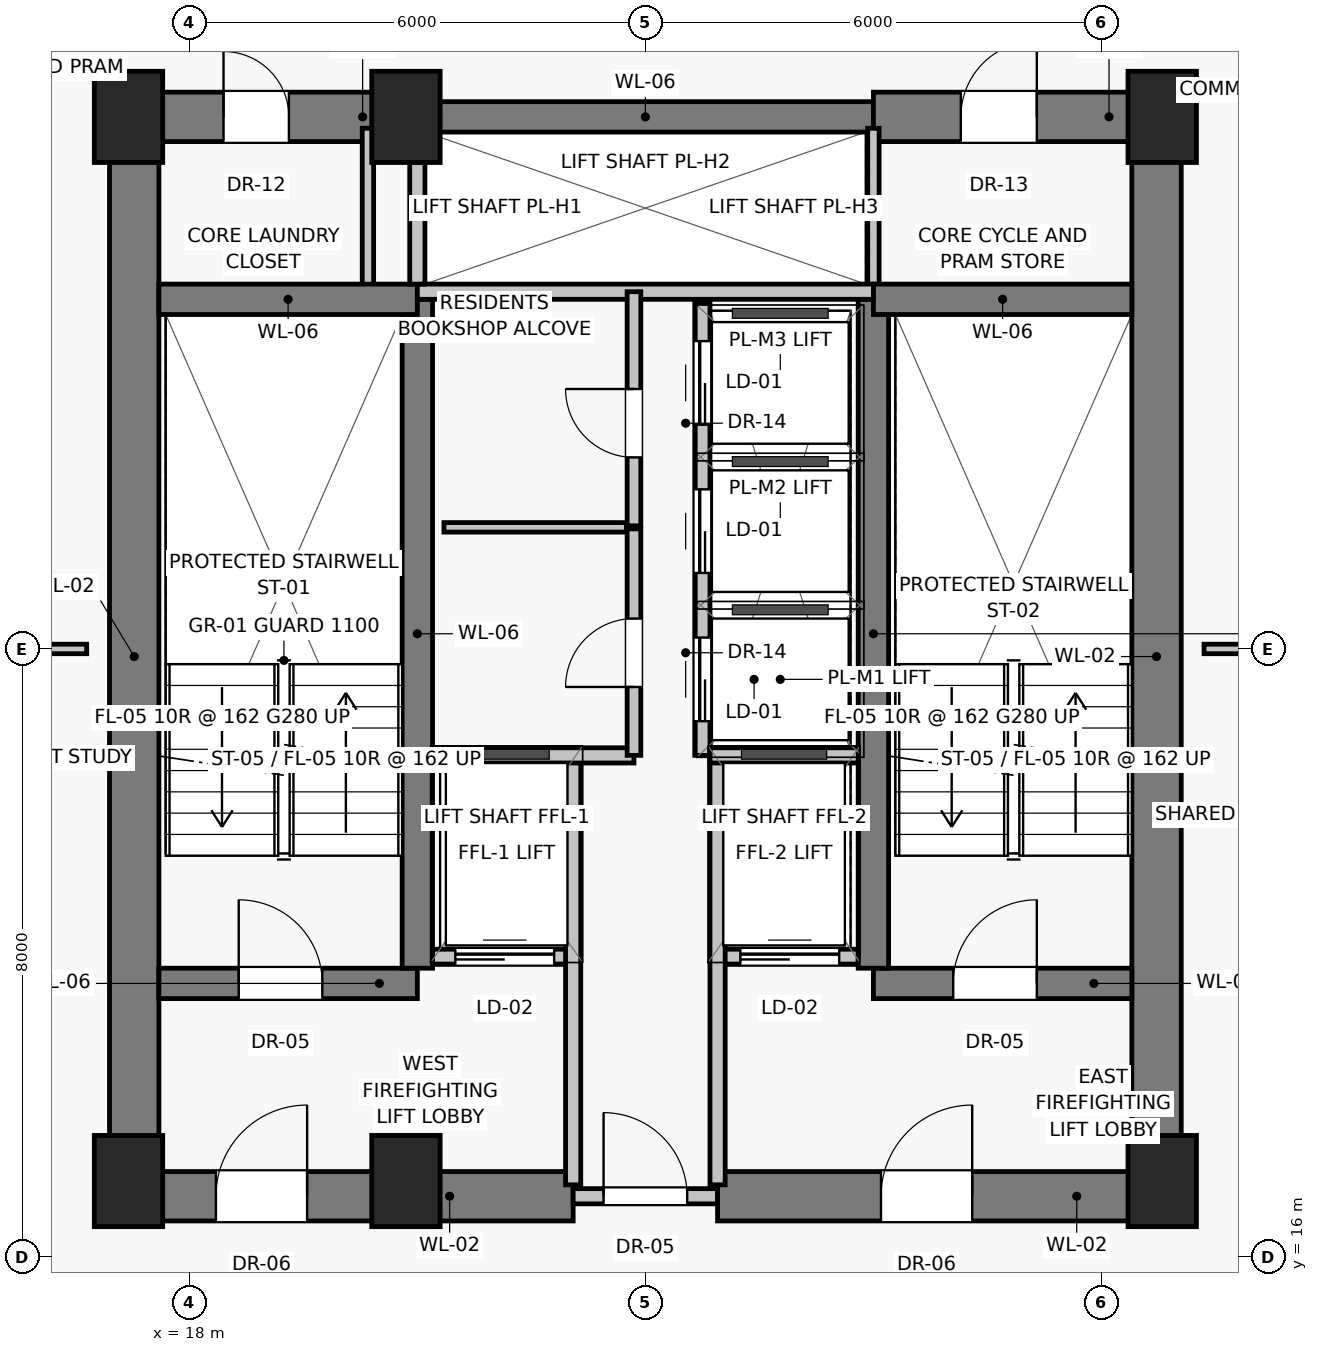
"""IFC4 building model, lengths in metres.
Left out: names, types, materials, properties, quantities, classifications, styles, units other than length and angle.
Written with IfcOpenShell. Run it as: python <this file> out.ifc"""

import sys

from ifc_helpers import new_model, si_unit, direction, frame, frame_2d, origin, origin_2d, place, context, subcontext, project, spatial, rectangle, extrude, source, transform, mapped, element, fill, save


model = new_model("IFC4")
c1 = context("Model", 3, precision=1e-05, world=origin(), true_north=direction((0.0, 1.0)))
c2 = subcontext(c1, "Body", "Model", "MODEL_VIEW")
j1 = project(units=[si_unit("LENGTHUNIT", "METRE"), si_unit("PLANEANGLEUNIT", "RADIAN")], contexts=[c1])
p1 = place(None, origin())
s1 = spatial("IfcSite", under=j1, at=p1, CompositionType="ELEMENT")
p2 = place(p1, origin())
s2 = spatial("IfcBuilding", under=s1, at=p2, CompositionType="ELEMENT")
p3 = place(p2, frame((0.0, 0.0, 155.5)))
s3 = spatial("IfcBuildingStorey", under=s2, at=p3, CompositionType="ELEMENT", Elevation=155.5)
for number, where, z_axis, x_axis in (
    (1, (17.2, 17.0, 0.0), (0.0, 0.0, 1.0), (1.0, 0.0, 0.0)),
    (2, (20.85, 17.0, 0.0), (0.0, 0.0, 1.0), (1.0, 0.0, 0.0)),
    (3, (30.8, 17.0, 0.0), (0.0, 0.0, 1.0), (1.0, 0.0, 0.0)),
    (4, (17.2, 31.0, 0.0), (0.0, 0.0, 1.0), (1.0, 0.0, 0.0)),
    (5, (20.85, 31.0, 0.0), (0.0, 0.0, 1.0), (1.0, 0.0, 0.0)),
    (6, (30.8, 31.0, 0.0), (0.0, 0.0, 1.0), (1.0, 0.0, 0.0)),
):
    element("IfcColumn", number, at=place(p3, frame(where, z_axis=z_axis, x_axis=x_axis)), inside=s3, PredefinedType="PILASTER", context=c2, shape_type="SweptSolid", body=[
        extrude(rectangle(XDim=0.9, YDim=1.2, at=origin_2d()), origin(), (0.0, 0.0, 1.0), 3.25),
    ])
for number, where, z_axis, x_axis in (
    (7, (17.275, 16.8, 0.0), (0.0, 0.0, 1.0), (0.0, 1.0, 0.0)),
    (8, (30.725, 16.8, 0.0), (0.0, 0.0, 1.0), (0.0, 1.0, 0.0)),
):
    element("IfcWall", number, at=place(p3, frame(where, z_axis=z_axis, x_axis=x_axis)), inside=s3, PredefinedType="SHEAR", context=c2, shape_type="SweptSolid", body=[
        extrude(rectangle(XDim=14.2, YDim=0.65, at=frame_2d((7.1, 0.0))), origin(), (0.0, 0.0, 1.0), 2.97),
    ])
p4 = place(p3, frame((17.2, 16.8, 0.0), z_axis=(0.0, 0.0, 1.0), x_axis=(1.0, 0.0, 0.0)))
e9 = element("IfcWall", 9, at=p4, inside=s3, PredefinedType="SHEAR", context=c2, shape_type="SweptSolid", body=[
    extrude(rectangle(XDim=5.85, YDim=0.65, at=frame_2d((2.925, 0.0))), origin(), (0.0, 0.0, 1.0), 2.97),
])
p5 = place(p4, frame((1.15, 0.0, 0.0)))
e10 = element("IfcOpeningElement", 10, at=p5, cuts=e9, PredefinedType="OPENING", context=c2, shape_type="SweptSolid", body=[
    extrude(rectangle(XDim=1.2, YDim=2.03, at=frame_2d((0.6, 1.015))), frame((0.0, 0.335, 0.0), z_axis=(0.0, -1.0, 0.0), x_axis=(1.0, 0.0, 0.0)), (0.0, 0.0, 1.0), 0.67),
])
p6 = place(p3, frame((23.05, 16.8, 0.0), z_axis=(0.0, 0.0, 1.0), x_axis=(1.0, 0.0, 0.0)))
e11 = element("IfcWall", 11, at=p6, inside=s3, PredefinedType="SOLIDWALL", context=c2, shape_type="SweptSolid", body=[
    extrude(rectangle(XDim=1.9, YDim=0.2, at=frame_2d((0.95, 0.0))), origin(), (0.0, 0.0, 1.0), 2.12),
])
p7 = place(p6, frame((0.4, 0.0, 0.0)))
e12 = element("IfcOpeningElement", 12, at=p7, cuts=e11, PredefinedType="OPENING", context=c2, shape_type="SweptSolid", body=[
    extrude(rectangle(XDim=1.1, YDim=2.03, at=frame_2d((0.55, 1.015))), frame((0.0, 0.11, 0.0), z_axis=(0.0, -1.0, 0.0), x_axis=(1.0, 0.0, 0.0)), (0.0, 0.0, 1.0), 0.22),
])
p8 = place(p3, frame((24.95, 16.8, 0.0), z_axis=(0.0, 0.0, 1.0), x_axis=(1.0, 0.0, 0.0)))
e13 = element("IfcWall", 13, at=p8, inside=s3, PredefinedType="SHEAR", context=c2, shape_type="SweptSolid", body=[
    extrude(rectangle(XDim=5.85, YDim=0.65, at=frame_2d((2.925, 0.0))), origin(), (0.0, 0.0, 1.0), 2.97),
])
p9 = place(p8, frame((2.15, 0.0, 0.0)))
e14 = element("IfcOpeningElement", 14, at=p9, cuts=e13, PredefinedType="OPENING", context=c2, shape_type="SweptSolid", body=[
    extrude(rectangle(XDim=1.2, YDim=2.03, at=frame_2d((0.6, 1.015))), frame((0.0, 0.335, 0.0), z_axis=(0.0, -1.0, 0.0), x_axis=(1.0, 0.0, 0.0)), (0.0, 0.0, 1.0), 0.67),
])
p10 = place(p3, frame((17.2, 31.0, 0.0), z_axis=(0.0, 0.0, 1.0), x_axis=(1.0, 0.0, 0.0)))
e15 = element("IfcWall", 15, at=p10, inside=s3, PredefinedType="SHEAR", context=c2, shape_type="SweptSolid", body=[
    extrude(rectangle(XDim=3.8, YDim=0.65, at=frame_2d((1.9, 0.0))), origin(), (0.0, 0.0, 1.0), 2.97),
])
p11 = place(p10, frame((1.25, 0.0, 0.0)))
e16 = element("IfcOpeningElement", 16, at=p11, cuts=e15, PredefinedType="OPENING", context=c2, shape_type="SweptSolid", body=[
    extrude(rectangle(XDim=0.86, YDim=2.01, at=frame_2d((0.43, 1.005))), frame((0.0, 0.335, 0.0), z_axis=(0.0, -1.0, 0.0), x_axis=(1.0, 0.0, 0.0)), (0.0, 0.0, 1.0), 0.67),
])
p12 = place(p3, frame((21.0, 31.0, 0.0), z_axis=(0.0, 0.0, 1.0), x_axis=(1.0, 0.0, 0.0)))
e17 = element("IfcWall", 17, at=p12, inside=s3, PredefinedType="SHEAR", context=c2, shape_type="SweptSolid", body=[
    extrude(rectangle(XDim=6.0, YDim=0.4, at=frame_2d((3.0, 0.0))), origin(), (0.0, 0.0, 1.0), 2.97),
])
p13 = place(p3, frame((27.0, 31.0, 0.0), z_axis=(0.0, 0.0, 1.0), x_axis=(1.0, 0.0, 0.0)))
e18 = element("IfcWall", 18, at=p13, inside=s3, PredefinedType="SHEAR", context=c2, shape_type="SweptSolid", body=[
    extrude(rectangle(XDim=3.8, YDim=0.65, at=frame_2d((1.9, 0.0))), origin(), (0.0, 0.0, 1.0), 2.97),
])
p14 = place(p13, frame((1.15, 0.0, 0.0)))
e19 = element("IfcOpeningElement", 19, at=p14, cuts=e18, PredefinedType="OPENING", context=c2, shape_type="SweptSolid", body=[
    extrude(rectangle(XDim=1.0, YDim=2.01, at=frame_2d((0.5, 1.005))), frame((0.0, 0.335, 0.0), z_axis=(0.0, -1.0, 0.0), x_axis=(1.0, 0.0, 0.0)), (0.0, 0.0, 1.0), 0.67),
])
for number, where, z_axis, x_axis in (
    (20, (20.35, 28.65, 0.0), (0.0, 0.0, 1.0), (0.0, 1.0, 0.0)),
    (21, (27.0, 28.65, 0.0), (0.0, 0.0, 1.0), (0.0, 1.0, 0.0)),
):
    element("IfcWall", number, at=place(p3, frame(where, z_axis=z_axis, x_axis=x_axis)), inside=s3, PredefinedType="PARTITIONING", context=c2, shape_type="SweptSolid", body=[
        extrude(rectangle(XDim=2.2, YDim=0.15, at=frame_2d((1.1, 0.0))), origin(), (0.0, 0.0, 1.0), 2.97),
    ])
p15 = place(p3, frame((17.6, 19.6, 0.0), z_axis=(0.0, 0.0, 1.0), x_axis=(1.0, 0.0, 0.0)))
e22 = element("IfcWall", 22, at=p15, inside=s3, PredefinedType="SHEAR", context=c2, shape_type="SweptSolid", body=[
    extrude(rectangle(XDim=3.4, YDim=0.4, at=frame_2d((1.7, 0.0))), origin(), (0.0, 0.0, 1.0), 2.97),
])
p16 = place(p15, frame((1.05, 0.0, 0.0)))
e23 = element("IfcOpeningElement", 23, at=p16, cuts=e22, PredefinedType="OPENING", context=c2, shape_type="SweptSolid", body=[
    extrude(rectangle(XDim=1.1, YDim=2.03, at=frame_2d((0.55, 1.015))), frame((0.0, 0.21, 0.0), z_axis=(0.0, -1.0, 0.0), x_axis=(1.0, 0.0, 0.0)), (0.0, 0.0, 1.0), 0.42),
])
p17 = place(p3, frame((21.2, 19.95, 0.0), z_axis=(0.0, 0.0, 1.0), x_axis=(1.0, 0.0, 0.0)))
e24 = element("IfcWall", 24, at=p17, inside=s3, PredefinedType="SOLIDWALL", context=c2, shape_type="SweptSolid", body=[
    extrude(rectangle(XDim=1.85, YDim=0.2, at=frame_2d((0.925, 0.0))), origin(), (0.0, 0.0, 1.0), 2.97),
])
p18 = place(p17, frame((0.3, 0.0, 0.0)))
e25 = element("IfcOpeningElement", 25, at=p18, cuts=e24, PredefinedType="OPENING", context=c2, shape_type="SweptSolid", body=[
    extrude(rectangle(XDim=1.3, YDim=2.25, at=frame_2d((0.65, 1.125))), frame((0.0, 0.11, 0.0), z_axis=(0.0, -1.0, 0.0), x_axis=(1.0, 0.0, 0.0)), (0.0, 0.0, 1.0), 0.22),
])
p19 = place(p3, frame((24.95, 19.95, 0.0), z_axis=(0.0, 0.0, 1.0), x_axis=(1.0, 0.0, 0.0)))
e26 = element("IfcWall", 26, at=p19, inside=s3, PredefinedType="SOLIDWALL", context=c2, shape_type="SweptSolid", body=[
    extrude(rectangle(XDim=1.85, YDim=0.2, at=frame_2d((0.925, 0.0))), origin(), (0.0, 0.0, 1.0), 2.97),
])
p20 = place(p19, frame((0.3, 0.0, 0.0)))
e27 = element("IfcOpeningElement", 27, at=p20, cuts=e26, PredefinedType="OPENING", context=c2, shape_type="SweptSolid", body=[
    extrude(rectangle(XDim=1.3, YDim=2.25, at=frame_2d((0.65, 1.125))), frame((0.0, 0.11, 0.0), z_axis=(0.0, -1.0, 0.0), x_axis=(1.0, 0.0, 0.0)), (0.0, 0.0, 1.0), 0.22),
])
p21 = place(p3, frame((27.0, 19.6, 0.0), z_axis=(0.0, 0.0, 1.0), x_axis=(1.0, 0.0, 0.0)))
e28 = element("IfcWall", 28, at=p21, inside=s3, PredefinedType="SHEAR", context=c2, shape_type="SweptSolid", body=[
    extrude(rectangle(XDim=3.4, YDim=0.4, at=frame_2d((1.7, 0.0))), origin(), (0.0, 0.0, 1.0), 2.97),
])
p22 = place(p21, frame((1.05, 0.0, 0.0)))
e29 = element("IfcOpeningElement", 29, at=p22, cuts=e28, PredefinedType="OPENING", context=c2, shape_type="SweptSolid", body=[
    extrude(rectangle(XDim=1.1, YDim=2.03, at=frame_2d((0.55, 1.015))), frame((0.0, 0.21, 0.0), z_axis=(0.0, -1.0, 0.0), x_axis=(1.0, 0.0, 0.0)), (0.0, 0.0, 1.0), 0.42),
])
for number, where, z_axis, x_axis in (
    (30, (21.0, 19.8, 0.0), (0.0, 0.0, 1.0), (0.0, 1.0, 0.0)),
    (31, (27.0, 19.8, 0.0), (0.0, 0.0, 1.0), (0.0, 1.0, 0.0)),
):
    element("IfcWall", number, at=place(p3, frame(where, z_axis=z_axis, x_axis=x_axis)), inside=s3, PredefinedType="SHEAR", context=c2, shape_type="SweptSolid", body=[
        extrude(rectangle(XDim=8.8, YDim=0.4, at=frame_2d((4.4, 0.0))), origin(), (0.0, 0.0, 1.0), 2.97),
    ])
for number, where, z_axis, x_axis in (
    (32, (17.6, 28.6, 0.0), (0.0, 0.0, 1.0), (1.0, 0.0, 0.0)),
    (33, (27.0, 28.6, 0.0), (0.0, 0.0, 1.0), (1.0, 0.0, 0.0)),
):
    element("IfcWall", number, at=place(p3, frame(where, z_axis=z_axis, x_axis=x_axis)), inside=s3, PredefinedType="SHEAR", context=c2, shape_type="SweptSolid", body=[
        extrude(rectangle(XDim=3.4, YDim=0.4, at=frame_2d((1.7, 0.0))), origin(), (0.0, 0.0, 1.0), 2.97),
    ])
for number, where, z_axis, x_axis in (
    (34, (23.05, 16.95, 0.0), (0.0, 0.0, 1.0), (0.0, 1.0, 0.0)),
    (35, (24.95, 16.95, 0.0), (0.0, 0.0, 1.0), (0.0, 1.0, 0.0)),
):
    element("IfcWall", number, at=place(p3, frame(where, z_axis=z_axis, x_axis=x_axis)), inside=s3, PredefinedType="SOLIDWALL", context=c2, shape_type="SweptSolid", body=[
        extrude(rectangle(XDim=5.6, YDim=0.2, at=frame_2d((2.8, 0.0))), origin(), (0.0, 0.0, 1.0), 2.97),
    ])
p23 = place(p3, frame((21.2, 22.6, 0.0), z_axis=(0.0, 0.0, 1.0), x_axis=(1.0, 0.0, 0.0)))
e36 = element("IfcWall", 36, at=p23, inside=s3, PredefinedType="SOLIDWALL", context=c2, shape_type="SweptSolid", body=[
    extrude(rectangle(XDim=2.65, YDim=0.2, at=frame_2d((1.325, 0.0))), origin(), (0.0, 0.0, 1.0), 2.97),
])
p24 = place(p3, frame((24.85, 22.6, 0.0), z_axis=(0.0, 0.0, 1.0), x_axis=(1.0, 0.0, 0.0)))
e37 = element("IfcWall", 37, at=p24, inside=s3, PredefinedType="SOLIDWALL", context=c2, shape_type="SweptSolid", body=[
    extrude(rectangle(XDim=1.95, YDim=0.2, at=frame_2d((0.975, 0.0))), origin(), (0.0, 0.0, 1.0), 2.97),
])
p25 = place(p3, frame((21.0, 28.7, 0.0), z_axis=(0.0, 0.0, 1.0), x_axis=(1.0, 0.0, 0.0)))
e38 = element("IfcWall", 38, at=p25, inside=s3, PredefinedType="SOLIDWALL", context=c2, shape_type="SweptSolid", body=[
    extrude(rectangle(XDim=6.0, YDim=0.2, at=frame_2d((3.0, 0.0))), origin(), (0.0, 0.0, 1.0), 2.97),
])
p26 = place(p3, frame((21.0, 28.8, 0.0), z_axis=(0.0, 0.0, 1.0), x_axis=(0.0, 1.0, 0.0)))
e39 = element("IfcWall", 39, at=p26, inside=s3, PredefinedType="SOLIDWALL", context=c2, shape_type="SweptSolid", body=[
    extrude(rectangle(XDim=1.6, YDim=0.2, at=frame_2d((0.8, 0.0))), origin(), (0.0, 0.0, 1.0), 2.97),
])
p27 = place(p3, frame((23.85, 22.6, 0.0), z_axis=(0.0, 0.0, 1.0), x_axis=(0.0, 1.0, 0.0)))
e40 = element("IfcWall", 40, at=p27, inside=s3, PredefinedType="PARTITIONING", context=c2, shape_type="SweptSolid", body=[
    extrude(rectangle(XDim=2.98, YDim=0.18, at=frame_2d((1.49, 0.0))), origin(), (0.0, 0.0, 1.0), 2.97),
])
p28 = place(p27, frame((0.9, 0.0, 0.0)))
e41 = element("IfcOpeningElement", 41, at=p28, cuts=e40, PredefinedType="OPENING", context=c2, shape_type="SweptSolid", body=[
    extrude(rectangle(XDim=0.9, YDim=2.01, at=frame_2d((0.45, 1.005))), frame((0.0, 0.1, 0.0), z_axis=(0.0, -1.0, 0.0), x_axis=(1.0, 0.0, 0.0)), (0.0, 0.0, 1.0), 0.2),
])
p29 = place(p3, frame((23.85, 25.62, 0.0), z_axis=(0.0, 0.0, 1.0), x_axis=(0.0, 1.0, 0.0)))
e42 = element("IfcWall", 42, at=p29, inside=s3, PredefinedType="PARTITIONING", context=c2, shape_type="SweptSolid", body=[
    extrude(rectangle(XDim=3.08, YDim=0.18, at=frame_2d((1.54, 0.0))), origin(), (0.0, 0.0, 1.0), 2.97),
])
p30 = place(p29, frame((0.9, 0.0, 0.0)))
e43 = element("IfcOpeningElement", 43, at=p30, cuts=e42, PredefinedType="OPENING", context=c2, shape_type="SweptSolid", body=[
    extrude(rectangle(XDim=0.9, YDim=2.01, at=frame_2d((0.45, 1.005))), frame((0.0, 0.1, 0.0), z_axis=(0.0, -1.0, 0.0), x_axis=(1.0, 0.0, 0.0)), (0.0, 0.0, 1.0), 0.2),
])
p31 = place(p3, frame((24.75, 22.6, 0.0), z_axis=(0.0, 0.0, 1.0), x_axis=(0.0, 1.0, 0.0)))
e44 = element("IfcWall", 44, at=p31, inside=s3, PredefinedType="SOLIDWALL", context=c2, shape_type="SweptSolid", body=[
    extrude(rectangle(XDim=5.95, YDim=0.2, at=frame_2d((2.975, 0.0))), origin(), (0.0, 0.0, 1.0), 2.97),
])
p32 = place(p31, frame((0.45, 0.0, 0.0)))
e45 = element("IfcOpeningElement", 45, at=p32, cuts=e44, PredefinedType="OPENING", context=c2, shape_type="SweptSolid", body=[
    extrude(rectangle(XDim=1.1, YDim=2.08, at=frame_2d((0.55, 1.04))), frame((0.0, 0.11, 0.0), z_axis=(0.0, -1.0, 0.0), x_axis=(1.0, 0.0, 0.0)), (0.0, 0.0, 1.0), 0.22),
])
p33 = place(p31, frame((2.4, 0.0, 0.0)))
e46 = element("IfcOpeningElement", 46, at=p33, cuts=e44, PredefinedType="OPENING", context=c2, shape_type="SweptSolid", body=[
    extrude(rectangle(XDim=1.1, YDim=2.08, at=frame_2d((0.55, 1.04))), frame((0.0, 0.11, 0.0), z_axis=(0.0, -1.0, 0.0), x_axis=(1.0, 0.0, 0.0)), (0.0, 0.0, 1.0), 0.22),
])
p34 = place(p31, frame((4.35, 0.0, 0.0)))
e47 = element("IfcOpeningElement", 47, at=p34, cuts=e44, PredefinedType="OPENING", context=c2, shape_type="SweptSolid", body=[
    extrude(rectangle(XDim=1.1, YDim=2.08, at=frame_2d((0.55, 1.04))), frame((0.0, 0.11, 0.0), z_axis=(0.0, -1.0, 0.0), x_axis=(1.0, 0.0, 0.0)), (0.0, 0.0, 1.0), 0.22),
])
p35 = place(p3, frame((21.35, 25.6, 0.0), z_axis=(0.0, 0.0, 1.0), x_axis=(1.0, 0.0, 0.0)))
e48 = element("IfcWall", 48, at=p35, inside=s3, PredefinedType="PARTITIONING", context=c2, shape_type="SweptSolid", body=[
    extrude(rectangle(XDim=2.4, YDim=0.125, at=frame_2d((1.2, 0.0))), origin(), (0.0, 0.0, 1.0), 2.97),
])
for number, where, z_axis, x_axis in (
    (49, (14.55, 24.0, 0.0), (0.0, 0.0, 1.0), (1.0, 0.0, 0.0)),
    (50, (31.35, 24.0, 0.0), (0.0, 0.0, 1.0), (1.0, 0.0, 0.0)),
):
    element("IfcWall", number, at=place(p3, frame(where, z_axis=z_axis, x_axis=x_axis)), inside=s3, PredefinedType="PARTITIONING", context=c2, shape_type="SweptSolid", body=[
        extrude(rectangle(XDim=2.1, YDim=0.125, at=frame_2d((1.05, 0.0))), origin(), (0.0, 0.0, 1.0), 2.97),
    ])
m1 = source(origin(), c2, "Body", "SweptSolid", [
    extrude(rectangle(XDim=1.2, YDim=2.03, at=frame_2d((0.6, 1.015))), frame((0.0, 0.025, 0.0), z_axis=(0.0, -1.0, 0.0), x_axis=(1.0, 0.0, 0.0)), (0.0, 0.0, 1.0), 0.05),
])
p36 = place(p5, origin())
e51 = element("IfcDoor", 51, at=p36, inside=s3, OperationType="SINGLE_SWING_RIGHT", PredefinedType="DOOR", context=c2, shape_type="MappedRepresentation", body=[
    mapped(m1, transform((0.0, 0.0, 0.0), scale=1.0)),
])
fill(e10, e51)
m2 = source(origin(), c2, "Body", "SweptSolid", [
    extrude(rectangle(XDim=1.1, YDim=2.03, at=frame_2d((0.55, 1.015))), frame((0.0, 0.025, 0.0), z_axis=(0.0, -1.0, 0.0), x_axis=(1.0, 0.0, 0.0)), (0.0, 0.0, 1.0), 0.05),
])
p37 = place(p7, origin())
e52 = element("IfcDoor", 52, at=p37, inside=s3, OperationType="SINGLE_SWING_LEFT", PredefinedType="DOOR", context=c2, shape_type="MappedRepresentation", body=[
    mapped(m2, transform((0.0, 0.0, 0.0), scale=1.0)),
])
fill(e12, e52)
p38 = place(p9, origin())
e53 = element("IfcDoor", 53, at=p38, inside=s3, OperationType="SINGLE_SWING_RIGHT", PredefinedType="DOOR", context=c2, shape_type="MappedRepresentation", body=[
    mapped(m1, transform((0.0, 0.0, 0.0), scale=1.0)),
])
fill(e14, e53)
m3 = source(origin(), c2, "Body", "SweptSolid", [
    extrude(rectangle(XDim=0.86, YDim=2.01, at=frame_2d((0.43, 1.005))), frame((0.0, 0.025, 0.0), z_axis=(0.0, -1.0, 0.0), x_axis=(1.0, 0.0, 0.0)), (0.0, 0.0, 1.0), 0.05),
])
p39 = place(p11, origin())
e54 = element("IfcDoor", 54, at=p39, inside=s3, OperationType="SINGLE_SWING_LEFT", PredefinedType="DOOR", context=c2, shape_type="MappedRepresentation", body=[
    mapped(m3, transform((0.0, 0.0, 0.0), scale=1.0)),
])
fill(e16, e54)
m4 = source(origin(), c2, "Body", "SweptSolid", [
    extrude(rectangle(XDim=1.0, YDim=2.01, at=frame_2d((0.5, 1.005))), frame((0.0, 0.025, 0.0), z_axis=(0.0, -1.0, 0.0), x_axis=(1.0, 0.0, 0.0)), (0.0, 0.0, 1.0), 0.05),
])
p40 = place(p14, origin())
e55 = element("IfcDoor", 55, at=p40, inside=s3, OperationType="SINGLE_SWING_RIGHT", PredefinedType="DOOR", context=c2, shape_type="MappedRepresentation", body=[
    mapped(m4, transform((0.0, 0.0, 0.0), scale=1.0)),
])
fill(e19, e55)
p41 = place(p16, origin())
e56 = element("IfcDoor", 56, at=p41, inside=s3, OperationType="SINGLE_SWING_LEFT", PredefinedType="DOOR", context=c2, shape_type="MappedRepresentation", body=[
    mapped(m2, transform((0.0, 0.0, 0.0), scale=1.0)),
])
fill(e23, e56)
m5 = source(origin(), c2, "Body", "SweptSolid", [
    extrude(rectangle(XDim=1.3, YDim=2.25, at=frame_2d((0.65, 1.125))), frame((0.0, 0.025, 0.0), z_axis=(0.0, -1.0, 0.0), x_axis=(1.0, 0.0, 0.0)), (0.0, 0.0, 1.0), 0.05),
])
p42 = place(p18, origin())
e57 = element("IfcDoor", 57, at=p42, inside=s3, OperationType="SLIDING_TO_LEFT", PredefinedType="DOOR", context=c2, shape_type="MappedRepresentation", body=[
    mapped(m5, transform((0.0, 0.0, 0.0), scale=1.0)),
])
fill(e25, e57)
p43 = place(p20, origin())
e58 = element("IfcDoor", 58, at=p43, inside=s3, OperationType="SLIDING_TO_LEFT", PredefinedType="DOOR", context=c2, shape_type="MappedRepresentation", body=[
    mapped(m5, transform((0.0, 0.0, 0.0), scale=1.0)),
])
fill(e27, e58)
p44 = place(p22, origin())
e59 = element("IfcDoor", 59, at=p44, inside=s3, OperationType="SINGLE_SWING_RIGHT", PredefinedType="DOOR", context=c2, shape_type="MappedRepresentation", body=[
    mapped(m2, transform((0.0, 0.0, 0.0), scale=1.0)),
])
fill(e29, e59)
m6 = source(origin(), c2, "Body", "SweptSolid", [
    extrude(rectangle(XDim=0.9, YDim=2.01, at=frame_2d((0.45, 1.005))), frame((0.0, 0.025, 0.0), z_axis=(0.0, -1.0, 0.0), x_axis=(1.0, 0.0, 0.0)), (0.0, 0.0, 1.0), 0.05),
])
p45 = place(p28, origin())
e60 = element("IfcDoor", 60, at=p45, inside=s3, OperationType="SINGLE_SWING_LEFT", PredefinedType="DOOR", context=c2, shape_type="MappedRepresentation", body=[
    mapped(m6, transform((0.0, 0.0, 0.0), scale=1.0)),
])
fill(e41, e60)
p46 = place(p30, origin())
e61 = element("IfcDoor", 61, at=p46, inside=s3, OperationType="SINGLE_SWING_RIGHT", PredefinedType="DOOR", context=c2, shape_type="MappedRepresentation", body=[
    mapped(m6, transform((0.0, 0.0, 0.0), scale=1.0)),
])
fill(e43, e61)
m7 = source(origin(), c2, "Body", "SweptSolid", [
    extrude(rectangle(XDim=1.1, YDim=2.08, at=frame_2d((0.55, 1.04))), frame((0.0, 0.025, 0.0), z_axis=(0.0, -1.0, 0.0), x_axis=(1.0, 0.0, 0.0)), (0.0, 0.0, 1.0), 0.05),
])
p47 = place(p32, origin())
e62 = element("IfcDoor", 62, at=p47, inside=s3, OperationType="SLIDING_TO_LEFT", PredefinedType="DOOR", context=c2, shape_type="MappedRepresentation", body=[
    mapped(m7, transform((0.0, 0.0, 0.0), scale=1.0)),
])
fill(e45, e62)
p48 = place(p33, origin())
e63 = element("IfcDoor", 63, at=p48, inside=s3, OperationType="SLIDING_TO_LEFT", PredefinedType="DOOR", context=c2, shape_type="MappedRepresentation", body=[
    mapped(m7, transform((0.0, 0.0, 0.0), scale=1.0)),
])
fill(e46, e63)
p49 = place(p34, origin())
e64 = element("IfcDoor", 64, at=p49, inside=s3, OperationType="SLIDING_TO_LEFT", PredefinedType="DOOR", context=c2, shape_type="MappedRepresentation", body=[
    mapped(m7, transform((0.0, 0.0, 0.0), scale=1.0)),
])
fill(e47, e64)
save(model, sys.argv[1])
